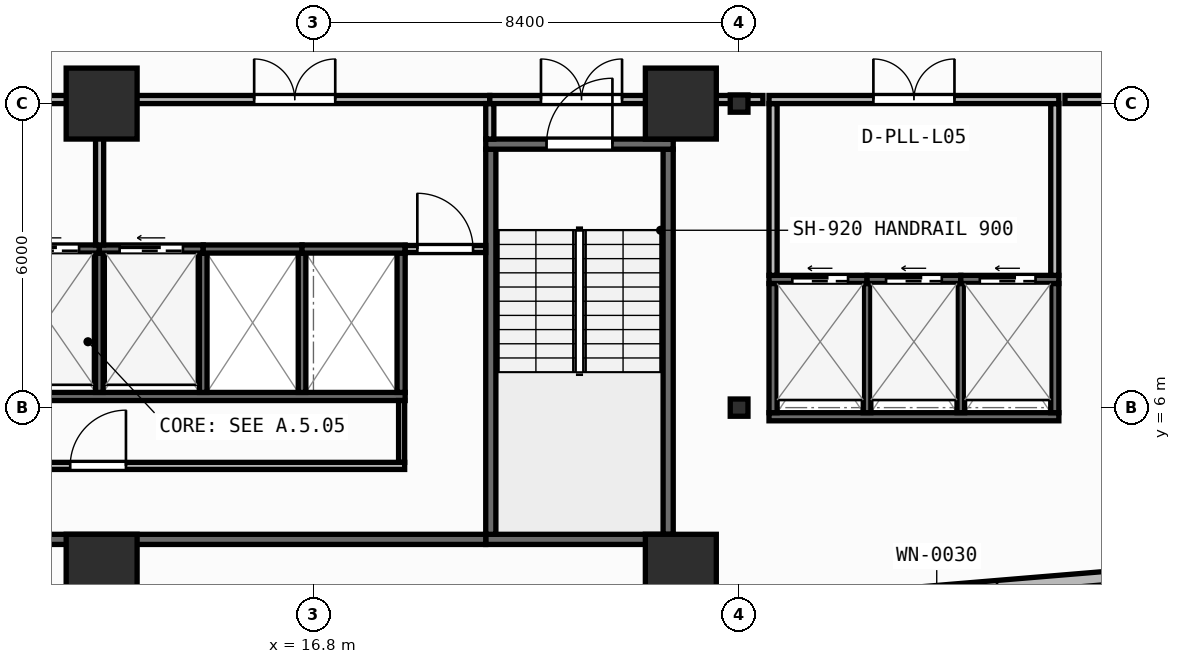
"""IFC4 building model, lengths in metres.
Left out: names, types, materials, properties, quantities, classifications, styles, units other than length and angle.
Written with IfcOpenShell. Run it as: python <this file> out.ifc"""

import sys

from ifc_helpers import new_model, si_unit, direction, frame, frame_2d, origin, origin_2d, place, context, subcontext, project, spatial, rectangle, i_section, extrude, element, fill, save


model = new_model("IFC4")
c1 = context("Model", 3, precision=1e-05, world=origin(), true_north=direction((0.0, 1.0)))
c2 = subcontext(c1, "Body", "Model", "MODEL_VIEW")
j1 = project(units=[si_unit("LENGTHUNIT", "METRE"), si_unit("PLANEANGLEUNIT", "RADIAN")], contexts=[c1])
p1 = place(None, origin())
s1 = spatial("IfcSite", under=j1, at=p1, CompositionType="ELEMENT")
p2 = place(p1, origin())
s2 = spatial("IfcBuilding", under=s1, at=p2, CompositionType="ELEMENT")
p3 = place(p2, frame((0.0, 0.0, 22.5)))
s3 = spatial("IfcBuildingStorey", under=s2, at=p3, CompositionType="ELEMENT", Elevation=22.5)
for number, where, z_axis, x_axis in (
    (1, (12.62, 2.8, 0.0), (0.0, 0.0, 1.0), (1.0, 0.0, 0.0)),
    (2, (24.05, 2.8, 0.0), (0.0, 0.0, 1.0), (1.0, 0.0, 0.0)),
):
    element("IfcColumn", number, at=place(p3, frame(where, z_axis=z_axis, x_axis=x_axis)), inside=s3, PredefinedType="COLUMN", context=c2, shape_type="SweptSolid", body=[
        extrude(rectangle(XDim=1.4, YDim=1.4, at=origin_2d()), origin(), (0.0, 0.0, 1.0), 3.95),
    ])
p4 = place(p3, frame((25.2, 6.0, 0.0), z_axis=(0.0, 0.0, 1.0), x_axis=(1.0, 0.0, 0.0)))
e3 = element("IfcColumn", 3, at=p4, inside=s3, PredefinedType="COLUMN", context=c2, shape_type="SweptSolid", body=[
    extrude(i_section(OverallWidth=0.35, OverallDepth=0.34, WebThickness=0.016, FlangeThickness=0.028, at=origin_2d()), origin(), (0.0, 0.0, 1.0), 3.95),
])
for number, where, z_axis, x_axis in (
    (4, (12.62, 12.0, 0.0), (0.0, 0.0, 1.0), (1.0, 0.0, 0.0)),
    (5, (24.05, 12.0, 0.0), (0.0, 0.0, 1.0), (1.0, 0.0, 0.0)),
):
    element("IfcColumn", number, at=place(p3, frame(where, z_axis=z_axis, x_axis=x_axis)), inside=s3, PredefinedType="COLUMN", context=c2, shape_type="SweptSolid", body=[
        extrude(rectangle(XDim=1.4, YDim=1.4, at=origin_2d()), origin(), (0.0, 0.0, 1.0), 3.95),
    ])
p5 = place(p3, frame((25.2, 12.0, 0.0), z_axis=(0.0, 0.0, 1.0), x_axis=(1.0, 0.0, 0.0)))
e6 = element("IfcColumn", 6, at=p5, inside=s3, PredefinedType="COLUMN", context=c2, shape_type="SweptSolid", body=[
    extrude(i_section(OverallWidth=0.35, OverallDepth=0.34, WebThickness=0.016, FlangeThickness=0.028, at=origin_2d()), origin(), (0.0, 0.0, 1.0), 3.95),
])
p6 = place(p3, frame((2.76, 0.174, 0.0), z_axis=(0.0, 0.0, 1.0), x_axis=(0.996571478456, 0.082736257641, 0.0)))
e7 = element("IfcWall", 7, at=p6, inside=s3, PredefinedType="STANDARD", context=c2, shape_type="SweptSolid", body=[
    extrude(rectangle(XDim=52.861, YDim=0.26, at=frame_2d((26.431, 0.0))), origin(), (0.0, 0.0, 1.0), 3.71),
])
p7 = place(p6, frame((25.231, 0.0, 0.9)))
e8 = element("IfcOpeningElement", 8, at=p7, cuts=e7, PredefinedType="OPENING", context=c2, shape_type="SweptSolid", body=[
    extrude(rectangle(XDim=2.4, YDim=1.65, at=frame_2d((1.2, 0.825))), frame((0.0, 0.14, 0.0), z_axis=(0.0, -1.0, 0.0), x_axis=(1.0, 0.0, 0.0)), (0.0, 0.0, 1.0), 0.28),
])
p8 = place(p3, frame((20.2, 3.4, 0.0), z_axis=(0.0, 0.0, 1.0), x_axis=(1.0, 0.0, 0.0)))
e9 = element("IfcWall", 9, at=p8, inside=s3, PredefinedType="SHEAR", context=c2, shape_type="SweptSolid", body=[
    extrude(rectangle(XDim=3.7, YDim=0.2, at=frame_2d((1.85, 0.0))), origin(), (0.0, 0.0, 1.0), 3.71),
])
for number, where, z_axis, x_axis in (
    (10, (20.3, 3.5, 0.0), (0.0, 0.0, 1.0), (0.0, 1.0, 0.0)),
    (11, (23.8, 3.5, 0.0), (0.0, 0.0, 1.0), (0.0, 1.0, 0.0)),
):
    element("IfcWall", number, at=place(p3, frame(where, z_axis=z_axis, x_axis=x_axis)), inside=s3, PredefinedType="SHEAR", context=c2, shape_type="SweptSolid", body=[
        extrude(rectangle(XDim=7.6, YDim=0.2, at=frame_2d((3.8, 0.0))), origin(), (0.0, 0.0, 1.0), 3.71),
    ])
p9 = place(p3, frame((20.2, 11.2, 0.0), z_axis=(0.0, 0.0, 1.0), x_axis=(1.0, 0.0, 0.0)))
e12 = element("IfcWall", 12, at=p9, inside=s3, PredefinedType="SHEAR", context=c2, shape_type="SweptSolid", body=[
    extrude(rectangle(XDim=3.7, YDim=0.2, at=frame_2d((1.85, 0.0))), origin(), (0.0, 0.0, 1.0), 3.71),
])
p10 = place(p9, frame((1.2, 0.0, 0.0)))
e13 = element("IfcOpeningElement", 13, at=p10, cuts=e12, PredefinedType="OPENING", context=c2, shape_type="SweptSolid", body=[
    extrude(rectangle(XDim=1.3, YDim=2.15, at=frame_2d((0.65, 1.075))), frame((0.0, 0.11, 0.0), z_axis=(0.0, -1.0, 0.0), x_axis=(1.0, 0.0, 0.0)), (0.0, 0.0, 1.0), 0.22),
])
p11 = place(p3, frame((6.5, 3.4, 0.0), z_axis=(0.0, 0.0, 1.0), x_axis=(1.0, 0.0, 0.0)))
e14 = element("IfcWall", 14, at=p11, inside=s3, PredefinedType="SHEAR", context=c2, shape_type="SweptSolid", body=[
    extrude(rectangle(XDim=13.7, YDim=0.2, at=frame_2d((6.85, 0.0))), origin(), (0.0, 0.0, 1.0), 3.71),
])
p12 = place(p3, frame((6.5, 6.22, 0.0), z_axis=(0.0, 0.0, 1.0), x_axis=(1.0, 0.0, 0.0)))
e15 = element("IfcWall", 15, at=p12, inside=s3, PredefinedType="SHEAR", context=c2, shape_type="SweptSolid", body=[
    extrude(rectangle(XDim=12.11, YDim=0.16, at=frame_2d((6.055, 0.0))), origin(), (0.0, 0.0, 1.0), 3.71),
])
p13 = place(p3, frame((18.53, 6.3, 0.0), z_axis=(0.0, 0.0, 1.0), x_axis=(0.0, 1.0, 0.0)))
e16 = element("IfcWall", 16, at=p13, inside=s3, PredefinedType="SHEAR", context=c2, shape_type="SweptSolid", body=[
    extrude(rectangle(XDim=2.75, YDim=0.16, at=frame_2d((1.375, 0.0))), origin(), (0.0, 0.0, 1.0), 3.71),
])
for number, where, z_axis, x_axis in (
    (17, (12.575, 6.3, 0.0), (0.0, 0.0, 1.0), (0.0, 1.0, 0.0)),
    (18, (14.625, 6.3, 0.0), (0.0, 0.0, 1.0), (0.0, 1.0, 0.0)),
    (19, (16.575, 6.3, 0.0), (0.0, 0.0, 1.0), (0.0, 1.0, 0.0)),
):
    element("IfcWall", number, at=place(p3, frame(where, z_axis=z_axis, x_axis=x_axis)), inside=s3, PredefinedType="SHEAR", context=c2, shape_type="SweptSolid", body=[
        extrude(rectangle(XDim=2.75, YDim=0.15, at=frame_2d((1.375, 0.0))), origin(), (0.0, 0.0, 1.0), 3.71),
    ])
p14 = place(p3, frame((10.525, 9.13, 0.0), z_axis=(0.0, 0.0, 1.0), x_axis=(1.0, 0.0, 0.0)))
e20 = element("IfcWall", 20, at=p14, inside=s3, PredefinedType="SHEAR", context=c2, shape_type="SweptSolid", body=[
    extrude(rectangle(XDim=2.05, YDim=0.16, at=frame_2d((1.025, 0.0))), origin(), (0.0, 0.0, 1.0), 3.71),
])
p15 = place(p14, frame((0.4, 0.0, 0.0)))
e21 = element("IfcOpeningElement", 21, at=p15, cuts=e20, PredefinedType="OPENING", context=c2, shape_type="SweptSolid", body=[
    extrude(rectangle(XDim=1.25, YDim=2.15, at=frame_2d((0.625, 1.075))), frame((0.0, 0.09, 0.0), z_axis=(0.0, -1.0, 0.0), x_axis=(1.0, 0.0, 0.0)), (0.0, 0.0, 1.0), 0.18),
])
p16 = place(p3, frame((12.575, 9.13, 0.0), z_axis=(0.0, 0.0, 1.0), x_axis=(1.0, 0.0, 0.0)))
e22 = element("IfcWall", 22, at=p16, inside=s3, PredefinedType="SHEAR", context=c2, shape_type="SweptSolid", body=[
    extrude(rectangle(XDim=2.05, YDim=0.16, at=frame_2d((1.025, 0.0))), origin(), (0.0, 0.0, 1.0), 3.71),
])
p17 = place(p16, frame((0.4, 0.0, 0.0)))
e23 = element("IfcOpeningElement", 23, at=p17, cuts=e22, PredefinedType="OPENING", context=c2, shape_type="SweptSolid", body=[
    extrude(rectangle(XDim=1.25, YDim=2.15, at=frame_2d((0.625, 1.075))), frame((0.0, 0.09, 0.0), z_axis=(0.0, -1.0, 0.0), x_axis=(1.0, 0.0, 0.0)), (0.0, 0.0, 1.0), 0.18),
])
p18 = place(p3, frame((14.625, 9.13, 0.0), z_axis=(0.0, 0.0, 1.0), x_axis=(1.0, 0.0, 0.0)))
e24 = element("IfcWall", 24, at=p18, inside=s3, PredefinedType="SHEAR", context=c2, shape_type="SweptSolid", body=[
    extrude(rectangle(XDim=1.95, YDim=0.16, at=frame_2d((0.975, 0.0))), origin(), (0.0, 0.0, 1.0), 3.71),
])
p19 = place(p3, frame((16.575, 9.13, 0.0), z_axis=(0.0, 0.0, 1.0), x_axis=(1.0, 0.0, 0.0)))
e25 = element("IfcWall", 25, at=p19, inside=s3, PredefinedType="SHEAR", context=c2, shape_type="SweptSolid", body=[
    extrude(rectangle(XDim=2.035, YDim=0.16, at=frame_2d((1.018, 0.0))), origin(), (0.0, 0.0, 1.0), 3.71),
])
p20 = place(p3, frame((25.79, 5.82, 0.0), z_axis=(0.0, 0.0, 1.0), x_axis=(1.0, 0.0, 0.0)))
e26 = element("IfcWall", 26, at=p20, inside=s3, PredefinedType="SHEAR", context=c2, shape_type="SweptSolid", body=[
    extrude(rectangle(XDim=5.72, YDim=0.16, at=frame_2d((2.86, 0.0))), origin(), (0.0, 0.0, 1.0), 3.71),
])
for number, where, z_axis, x_axis in (
    (27, (25.87, 5.9, 0.0), (0.0, 0.0, 1.0), (0.0, 1.0, 0.0)),
    (28, (31.43, 5.9, 0.0), (0.0, 0.0, 1.0), (0.0, 1.0, 0.0)),
):
    element("IfcWall", number, at=place(p3, frame(where, z_axis=z_axis, x_axis=x_axis)), inside=s3, PredefinedType="SHEAR", context=c2, shape_type="SweptSolid", body=[
        extrude(rectangle(XDim=2.55, YDim=0.16, at=frame_2d((1.275, 0.0))), origin(), (0.0, 0.0, 1.0), 3.71),
    ])
for number, where, z_axis, x_axis in (
    (29, (27.725, 5.9, 0.0), (0.0, 0.0, 1.0), (0.0, 1.0, 0.0)),
    (30, (29.575, 5.9, 0.0), (0.0, 0.0, 1.0), (0.0, 1.0, 0.0)),
):
    element("IfcWall", number, at=place(p3, frame(where, z_axis=z_axis, x_axis=x_axis)), inside=s3, PredefinedType="SHEAR", context=c2, shape_type="SweptSolid", body=[
        extrude(rectangle(XDim=2.55, YDim=0.15, at=frame_2d((1.275, 0.0))), origin(), (0.0, 0.0, 1.0), 3.71),
    ])
p21 = place(p3, frame((25.79, 8.53, 0.0), z_axis=(0.0, 0.0, 1.0), x_axis=(1.0, 0.0, 0.0)))
e31 = element("IfcWall", 31, at=p21, inside=s3, PredefinedType="SHEAR", context=c2, shape_type="SweptSolid", body=[
    extrude(rectangle(XDim=1.935, YDim=0.16, at=frame_2d((0.968, 0.0))), origin(), (0.0, 0.0, 1.0), 3.71),
])
p22 = place(p21, frame((0.46, 0.0, 0.0)))
e32 = element("IfcOpeningElement", 32, at=p22, cuts=e31, PredefinedType="OPENING", context=c2, shape_type="SweptSolid", body=[
    extrude(rectangle(XDim=1.1, YDim=2.15, at=frame_2d((0.55, 1.075))), frame((0.0, 0.09, 0.0), z_axis=(0.0, -1.0, 0.0), x_axis=(1.0, 0.0, 0.0)), (0.0, 0.0, 1.0), 0.18),
])
p23 = place(p3, frame((27.725, 8.53, 0.0), z_axis=(0.0, 0.0, 1.0), x_axis=(1.0, 0.0, 0.0)))
e33 = element("IfcWall", 33, at=p23, inside=s3, PredefinedType="SHEAR", context=c2, shape_type="SweptSolid", body=[
    extrude(rectangle(XDim=1.85, YDim=0.16, at=frame_2d((0.925, 0.0))), origin(), (0.0, 0.0, 1.0), 3.71),
])
p24 = place(p23, frame((0.375, 0.0, 0.0)))
e34 = element("IfcOpeningElement", 34, at=p24, cuts=e33, PredefinedType="OPENING", context=c2, shape_type="SweptSolid", body=[
    extrude(rectangle(XDim=1.1, YDim=2.15, at=frame_2d((0.55, 1.075))), frame((0.0, 0.09, 0.0), z_axis=(0.0, -1.0, 0.0), x_axis=(1.0, 0.0, 0.0)), (0.0, 0.0, 1.0), 0.18),
])
p25 = place(p3, frame((29.575, 8.53, 0.0), z_axis=(0.0, 0.0, 1.0), x_axis=(1.0, 0.0, 0.0)))
e35 = element("IfcWall", 35, at=p25, inside=s3, PredefinedType="SHEAR", context=c2, shape_type="SweptSolid", body=[
    extrude(rectangle(XDim=1.935, YDim=0.16, at=frame_2d((0.968, 0.0))), origin(), (0.0, 0.0, 1.0), 3.71),
])
p26 = place(p25, frame((0.375, 0.0, 0.0)))
e36 = element("IfcOpeningElement", 36, at=p26, cuts=e35, PredefinedType="OPENING", context=c2, shape_type="SweptSolid", body=[
    extrude(rectangle(XDim=1.1, YDim=2.15, at=frame_2d((0.55, 1.075))), frame((0.0, 0.09, 0.0), z_axis=(0.0, -1.0, 0.0), x_axis=(1.0, 0.0, 0.0)), (0.0, 0.0, 1.0), 0.18),
])
p27 = place(p3, frame((18.54, 4.92, 0.0), z_axis=(0.0, 0.0, 1.0), x_axis=(0.0, 1.0, 0.0)))
e37 = element("IfcWall", 37, at=p27, inside=s3, PredefinedType="PARTITIONING", context=c2, shape_type="SweptSolid", body=[
    extrude(rectangle(XDim=1.22, YDim=0.12, at=frame_2d((0.61, 0.0))), origin(), (0.0, 0.0, 1.0), 3.71),
])
p28 = place(p3, frame((6.5, 4.85, 0.0), z_axis=(0.0, 0.0, 1.0), x_axis=(1.0, 0.0, 0.0)))
e38 = element("IfcWall", 38, at=p28, inside=s3, PredefinedType="PARTITIONING", context=c2, shape_type="SweptSolid", body=[
    extrude(rectangle(XDim=12.1, YDim=0.14, at=frame_2d((6.05, 0.0))), origin(), (0.0, 0.0, 1.0), 3.71),
])
p29 = place(p28, frame((5.5, 0.0, 0.0)))
e39 = element("IfcOpeningElement", 39, at=p29, cuts=e38, PredefinedType="OPENING", context=c2, shape_type="SweptSolid", body=[
    extrude(rectangle(XDim=1.1, YDim=2.1, at=frame_2d((0.55, 1.05))), frame((0.0, 0.08, 0.0), z_axis=(0.0, -1.0, 0.0), x_axis=(1.0, 0.0, 0.0)), (0.0, 0.0, 1.0), 0.16),
])
p30 = place(p3, frame((18.61, 9.13, 0.0), z_axis=(0.0, 0.0, 1.0), x_axis=(1.0, 0.0, 0.0)))
e40 = element("IfcWall", 40, at=p30, inside=s3, PredefinedType="PARTITIONING", context=c2, shape_type="SweptSolid", body=[
    extrude(rectangle(XDim=1.59, YDim=0.14, at=frame_2d((0.795, 0.0))), origin(), (0.0, 0.0, 1.0), 3.71),
])
p31 = place(p30, frame((0.24, 0.0, 0.0)))
e41 = element("IfcOpeningElement", 41, at=p31, cuts=e40, PredefinedType="OPENING", context=c2, shape_type="SweptSolid", body=[
    extrude(rectangle(XDim=1.1, YDim=2.1, at=frame_2d((0.55, 1.05))), frame((0.0, 0.08, 0.0), z_axis=(0.0, -1.0, 0.0), x_axis=(1.0, 0.0, 0.0)), (0.0, 0.0, 1.0), 0.16),
])
p32 = place(p3, frame((6.4, 12.08, 0.0), z_axis=(0.0, 0.0, 1.0), x_axis=(1.0, 0.0, 0.0)))
e42 = element("IfcWall", 42, at=p32, inside=s3, PredefinedType="PARTITIONING", context=c2, shape_type="SweptSolid", body=[
    extrude(rectangle(XDim=6.18, YDim=0.16, at=frame_2d((3.09, 0.0))), origin(), (0.0, 0.0, 1.0), 3.073),
])
p33 = place(p32, frame((2.29, 0.0, 0.0)))
e43 = element("IfcOpeningElement", 43, at=p33, cuts=e42, PredefinedType="OPENING", context=c2, shape_type="SweptSolid", body=[
    extrude(rectangle(XDim=1.6, YDim=2.05, at=frame_2d((0.8, 1.025))), frame((0.0, 0.09, 0.0), z_axis=(0.0, -1.0, 0.0), x_axis=(1.0, 0.0, 0.0)), (0.0, 0.0, 1.0), 0.18),
])
p34 = place(p3, frame((12.58, 9.21, 0.0), z_axis=(0.0, 0.0, 1.0), x_axis=(0.0, 1.0, 0.0)))
e44 = element("IfcWall", 44, at=p34, inside=s3, PredefinedType="PARTITIONING", context=c2, shape_type="SweptSolid", body=[
    extrude(rectangle(XDim=2.79, YDim=0.16, at=frame_2d((1.395, 0.0))), origin(), (0.0, 0.0, 1.0), 3.71),
])
p35 = place(p3, frame((12.58, 12.08, 0.0), z_axis=(0.0, 0.0, 1.0), x_axis=(1.0, 0.0, 0.0)))
e45 = element("IfcWall", 45, at=p35, inside=s3, PredefinedType="PARTITIONING", context=c2, shape_type="SweptSolid", body=[
    extrude(rectangle(XDim=7.7, YDim=0.16, at=frame_2d((3.85, 0.0))), origin(), (0.0, 0.0, 1.0), 3.073),
])
p36 = place(p35, frame((3.05, 0.0, 0.0)))
e46 = element("IfcOpeningElement", 46, at=p36, cuts=e45, PredefinedType="OPENING", context=c2, shape_type="SweptSolid", body=[
    extrude(rectangle(XDim=1.6, YDim=2.05, at=frame_2d((0.8, 1.025))), frame((0.0, 0.09, 0.0), z_axis=(0.0, -1.0, 0.0), x_axis=(1.0, 0.0, 0.0)), (0.0, 0.0, 1.0), 0.18),
])
p37 = place(p3, frame((20.28, 11.3, 0.0), z_axis=(0.0, 0.0, 1.0), x_axis=(0.0, 1.0, 0.0)))
e47 = element("IfcWall", 47, at=p37, inside=s3, PredefinedType="PARTITIONING", context=c2, shape_type="SweptSolid", body=[
    extrude(rectangle(XDim=0.7, YDim=0.16, at=frame_2d((0.35, 0.0))), origin(), (0.0, 0.0, 1.0), 3.71),
])
p38 = place(p3, frame((20.28, 12.08, 0.0), z_axis=(0.0, 0.0, 1.0), x_axis=(1.0, 0.0, 0.0)))
e48 = element("IfcWall", 48, at=p38, inside=s3, PredefinedType="PARTITIONING", context=c2, shape_type="SweptSolid", body=[
    extrude(rectangle(XDim=3.62, YDim=0.16, at=frame_2d((1.81, 0.0))), origin(), (0.0, 0.0, 1.0), 3.073),
])
p39 = place(p38, frame((1.01, 0.0, 0.0)))
e49 = element("IfcOpeningElement", 49, at=p39, cuts=e48, PredefinedType="OPENING", context=c2, shape_type="SweptSolid", body=[
    extrude(rectangle(XDim=1.6, YDim=2.05, at=frame_2d((0.8, 1.025))), frame((0.0, 0.09, 0.0), z_axis=(0.0, -1.0, 0.0), x_axis=(1.0, 0.0, 0.0)), (0.0, 0.0, 1.0), 0.18),
])
p40 = place(p3, frame((23.82, 11.3, 0.0), z_axis=(0.0, 0.0, 1.0), x_axis=(0.0, 1.0, 0.0)))
e50 = element("IfcWall", 50, at=p40, inside=s3, PredefinedType="PARTITIONING", context=c2, shape_type="SweptSolid", body=[
    extrude(rectangle(XDim=0.7, YDim=0.16, at=frame_2d((0.35, 0.0))), origin(), (0.0, 0.0, 1.0), 3.71),
])
for number, where, z_axis, x_axis in (
    (51, (25.87, 8.61, 0.0), (0.0, 0.0, 1.0), (0.0, 1.0, 0.0)),
    (52, (31.43, 8.61, 0.0), (0.0, 0.0, 1.0), (0.0, 1.0, 0.0)),
):
    element("IfcWall", number, at=place(p3, frame(where, z_axis=z_axis, x_axis=x_axis)), inside=s3, PredefinedType="PARTITIONING", context=c2, shape_type="SweptSolid", body=[
        extrude(rectangle(XDim=3.39, YDim=0.16, at=frame_2d((1.695, 0.0))), origin(), (0.0, 0.0, 1.0), 3.71),
    ])
p41 = place(p3, frame((25.79, 12.08, 0.0), z_axis=(0.0, 0.0, 1.0), x_axis=(1.0, 0.0, 0.0)))
e53 = element("IfcWall", 53, at=p41, inside=s3, PredefinedType="PARTITIONING", context=c2, shape_type="SweptSolid", body=[
    extrude(rectangle(XDim=5.72, YDim=0.16, at=frame_2d((2.86, 0.0))), origin(), (0.0, 0.0, 1.0), 3.073),
])
p42 = place(p41, frame((2.06, 0.0, 0.0)))
e54 = element("IfcOpeningElement", 54, at=p42, cuts=e53, PredefinedType="OPENING", context=c2, shape_type="SweptSolid", body=[
    extrude(rectangle(XDim=1.6, YDim=2.05, at=frame_2d((0.8, 1.025))), frame((0.0, 0.09, 0.0), z_axis=(0.0, -1.0, 0.0), x_axis=(1.0, 0.0, 0.0)), (0.0, 0.0, 1.0), 0.18),
])
p43 = place(p3, frame((24.02, 12.08, 0.0), z_axis=(0.0, 0.0, 1.0), x_axis=(1.0, 0.0, 0.0)))
e55 = element("IfcWall", 55, at=p43, inside=s3, PredefinedType="PARTITIONING", context=c2, shape_type="SweptSolid", body=[
    extrude(rectangle(XDim=1.65, YDim=0.16, at=frame_2d((0.825, 0.0))), origin(), (0.0, 0.0, 1.0), 3.073),
])
p44 = place(p3, frame((31.63, 12.08, 0.0), z_axis=(0.0, 0.0, 1.0), x_axis=(1.0, 0.0, 0.0)))
e56 = element("IfcWall", 56, at=p44, inside=s3, PredefinedType="PARTITIONING", context=c2, shape_type="SweptSolid", body=[
    extrude(rectangle(XDim=11.181, YDim=0.16, at=frame_2d((5.59, 0.0))), origin(), (0.0, 0.0, 1.0), 3.073),
])
p45 = place(p10, origin())
e57 = element("IfcDoor", 57, at=p45, inside=s3, OperationType="SINGLE_SWING_RIGHT", PredefinedType="DOOR", context=c2, shape_type="SweptSolid", body=[
    extrude(rectangle(XDim=1.3, YDim=2.15, at=frame_2d((0.65, 1.075))), frame((0.0, 0.025, 0.0), z_axis=(0.0, -1.0, 0.0), x_axis=(1.0, 0.0, 0.0)), (0.0, 0.0, 1.0), 0.05),
])
fill(e13, e57)
p46 = place(p15, origin())
e58 = element("IfcDoor", 58, at=p46, inside=s3, OperationType="SLIDING_TO_LEFT", PredefinedType="DOOR", context=c2, shape_type="SweptSolid", body=[
    extrude(rectangle(XDim=1.25, YDim=2.15, at=frame_2d((0.625, 1.075))), frame((0.0, 0.025, 0.0), z_axis=(0.0, -1.0, 0.0), x_axis=(1.0, 0.0, 0.0)), (0.0, 0.0, 1.0), 0.05),
])
fill(e21, e58)
p47 = place(p17, origin())
e59 = element("IfcDoor", 59, at=p47, inside=s3, OperationType="SLIDING_TO_LEFT", PredefinedType="DOOR", context=c2, shape_type="SweptSolid", body=[
    extrude(rectangle(XDim=1.25, YDim=2.15, at=frame_2d((0.625, 1.075))), frame((0.0, 0.025, 0.0), z_axis=(0.0, -1.0, 0.0), x_axis=(1.0, 0.0, 0.0)), (0.0, 0.0, 1.0), 0.05),
])
fill(e23, e59)
p48 = place(p22, origin())
e60 = element("IfcDoor", 60, at=p48, inside=s3, OperationType="SLIDING_TO_LEFT", PredefinedType="DOOR", context=c2, shape_type="SweptSolid", body=[
    extrude(rectangle(XDim=1.1, YDim=2.15, at=frame_2d((0.55, 1.075))), frame((0.0, 0.025, 0.0), z_axis=(0.0, -1.0, 0.0), x_axis=(1.0, 0.0, 0.0)), (0.0, 0.0, 1.0), 0.05),
])
fill(e32, e60)
p49 = place(p24, origin())
e61 = element("IfcDoor", 61, at=p49, inside=s3, OperationType="SLIDING_TO_LEFT", PredefinedType="DOOR", context=c2, shape_type="SweptSolid", body=[
    extrude(rectangle(XDim=1.1, YDim=2.15, at=frame_2d((0.55, 1.075))), frame((0.0, 0.025, 0.0), z_axis=(0.0, -1.0, 0.0), x_axis=(1.0, 0.0, 0.0)), (0.0, 0.0, 1.0), 0.05),
])
fill(e34, e61)
p50 = place(p26, origin())
e62 = element("IfcDoor", 62, at=p50, inside=s3, OperationType="SLIDING_TO_LEFT", PredefinedType="DOOR", context=c2, shape_type="SweptSolid", body=[
    extrude(rectangle(XDim=1.1, YDim=2.15, at=frame_2d((0.55, 1.075))), frame((0.0, 0.025, 0.0), z_axis=(0.0, -1.0, 0.0), x_axis=(1.0, 0.0, 0.0)), (0.0, 0.0, 1.0), 0.05),
])
fill(e36, e62)
p51 = place(p29, origin())
e63 = element("IfcDoor", 63, at=p51, inside=s3, OperationType="SINGLE_SWING_RIGHT", PredefinedType="DOOR", context=c2, shape_type="SweptSolid", body=[
    extrude(rectangle(XDim=1.1, YDim=2.1, at=frame_2d((0.55, 1.05))), frame((0.0, 0.025, 0.0), z_axis=(0.0, -1.0, 0.0), x_axis=(1.0, 0.0, 0.0)), (0.0, 0.0, 1.0), 0.05),
])
fill(e39, e63)
p52 = place(p31, origin())
e64 = element("IfcDoor", 64, at=p52, inside=s3, OperationType="SINGLE_SWING_LEFT", PredefinedType="DOOR", context=c2, shape_type="SweptSolid", body=[
    extrude(rectangle(XDim=1.1, YDim=2.1, at=frame_2d((0.55, 1.05))), frame((0.0, 0.025, 0.0), z_axis=(0.0, -1.0, 0.0), x_axis=(1.0, 0.0, 0.0)), (0.0, 0.0, 1.0), 0.05),
])
fill(e41, e64)
p53 = place(p36, origin())
e65 = element("IfcDoor", 65, at=p53, inside=s3, OperationType="DOUBLE_DOOR_SINGLE_SWING", PredefinedType="DOOR", context=c2, shape_type="SweptSolid", body=[
    extrude(rectangle(XDim=1.6, YDim=2.05, at=frame_2d((0.8, 1.025))), frame((0.0, 0.025, 0.0), z_axis=(0.0, -1.0, 0.0), x_axis=(1.0, 0.0, 0.0)), (0.0, 0.0, 1.0), 0.05),
])
fill(e46, e65)
p54 = place(p39, origin())
e66 = element("IfcDoor", 66, at=p54, inside=s3, OperationType="DOUBLE_DOOR_SINGLE_SWING", PredefinedType="DOOR", context=c2, shape_type="SweptSolid", body=[
    extrude(rectangle(XDim=1.6, YDim=2.05, at=frame_2d((0.8, 1.025))), frame((0.0, 0.025, 0.0), z_axis=(0.0, -1.0, 0.0), x_axis=(1.0, 0.0, 0.0)), (0.0, 0.0, 1.0), 0.05),
])
fill(e49, e66)
p55 = place(p42, origin())
e67 = element("IfcDoor", 67, at=p55, inside=s3, OperationType="DOUBLE_DOOR_SINGLE_SWING", PredefinedType="DOOR", context=c2, shape_type="SweptSolid", body=[
    extrude(rectangle(XDim=1.6, YDim=2.05, at=frame_2d((0.8, 1.025))), frame((0.0, 0.025, 0.0), z_axis=(0.0, -1.0, 0.0), x_axis=(1.0, 0.0, 0.0)), (0.0, 0.0, 1.0), 0.05),
])
fill(e54, e67)
save(model, sys.argv[1])
